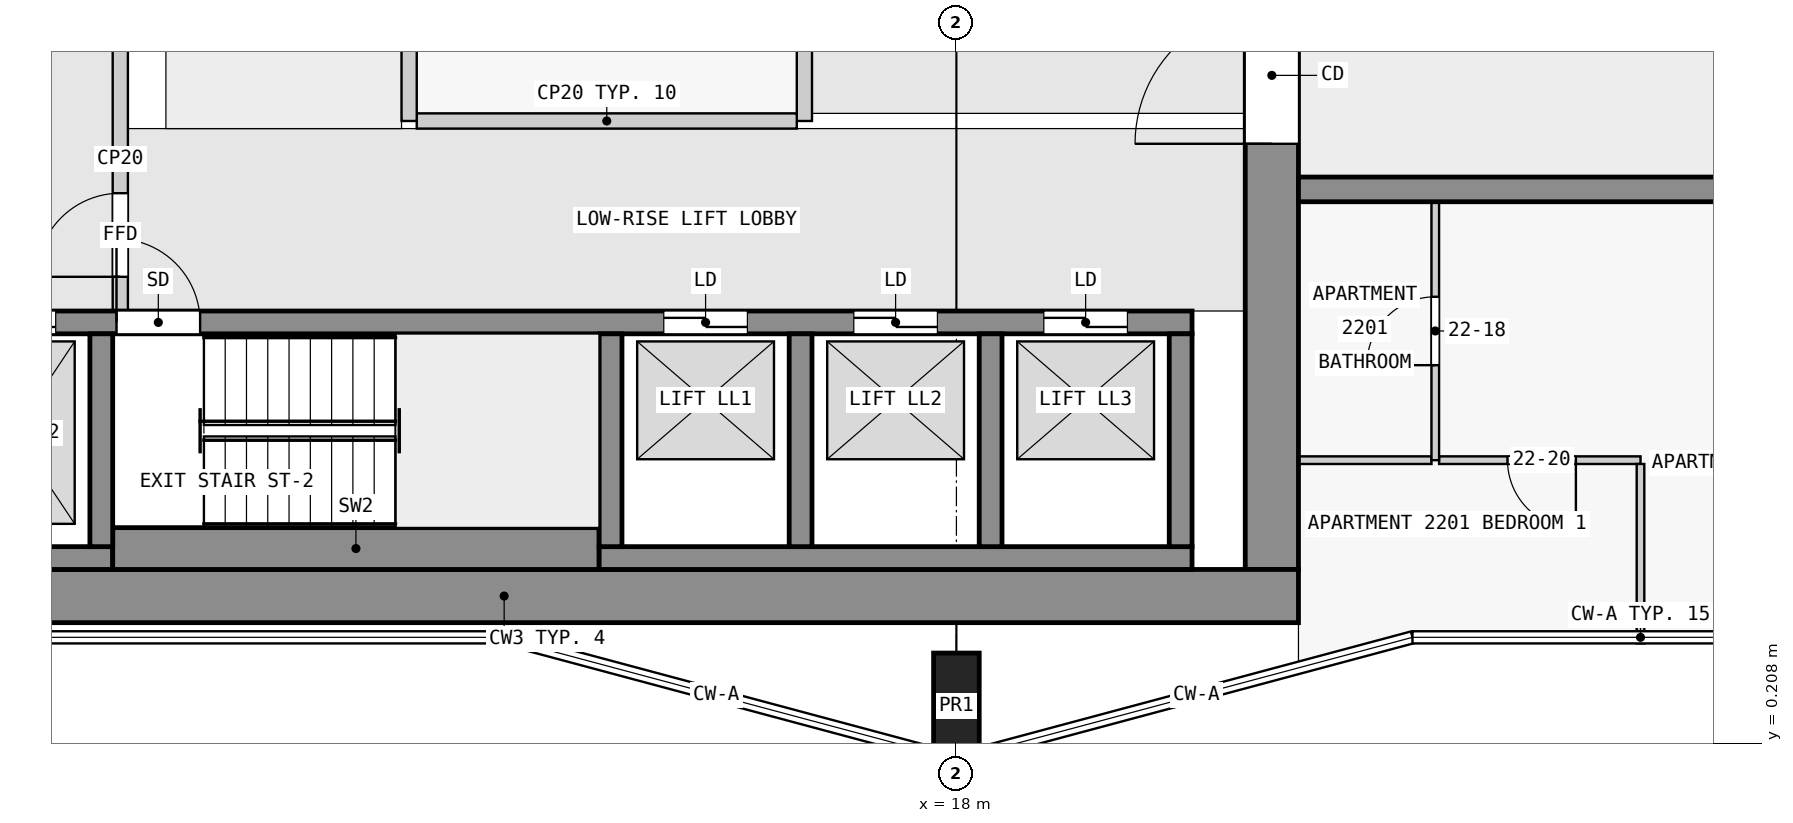
"""IFC4 building model, lengths in metres.
Left out: names, types, materials, properties, quantities, classifications, styles, units other than length and angle.
Written with IfcOpenShell. Run it as: python <this file> out.ifc"""

import sys

from ifc_helpers import new_model, si_unit, direction, frame, frame_2d, origin, origin_2d, place, context, subcontext, project, spatial, rectangle, extrude, element, fill, save


model = new_model("IFC4")
c1 = context("Model", 3, precision=1e-05, world=origin(), true_north=direction((0.0, 1.0)))
c2 = subcontext(c1, "Body", "Model", "MODEL_VIEW")
j1 = project(units=[si_unit("LENGTHUNIT", "METRE"), si_unit("PLANEANGLEUNIT", "RADIAN")], contexts=[c1])
p1 = place(None, origin())
s1 = spatial("IfcSite", under=j1, at=p1, CompositionType="ELEMENT")
p2 = place(p1, origin())
s2 = spatial("IfcBuilding", under=s1, at=p2, CompositionType="ELEMENT")
p3 = place(p2, frame((0.0, 0.0, 88.8)))
s3 = spatial("IfcBuildingStorey", under=s2, at=p3, CompositionType="ELEMENT", Elevation=88.8)
p4 = place(p3, frame((18.0, 0.7, 0.0), z_axis=(0.0, 0.0, 1.0), x_axis=(1.0, 0.0, 0.0)))
e1 = element("IfcColumn", 1, at=p4, inside=s3, PredefinedType="COLUMN", context=c2, shape_type="SweptSolid", body=[
    extrude(rectangle(XDim=0.6, YDim=1.4, at=origin_2d()), origin(), (0.0, 0.0, 1.0), 3.5),
])
p5 = place(p3, frame((1.6, 2.15, 0.0), z_axis=(0.0, 0.0, 1.0), x_axis=(1.0, 0.0, 0.0)))
e2 = element("IfcWall", 2, at=p5, inside=s3, PredefinedType="SHEAR", context=c2, shape_type="SweptSolid", body=[
    extrude(rectangle(XDim=20.9, YDim=0.7, at=frame_2d((10.45, 0.0))), origin(), (0.0, 0.0, 1.0), 3.25),
])
p6 = place(p3, frame((22.15, 2.5, 0.0), z_axis=(0.0, 0.0, 1.0), x_axis=(0.0, 1.0, 0.0)))
e3 = element("IfcWall", 3, at=p6, inside=s3, PredefinedType="SHEAR", context=c2, shape_type="SweptSolid", body=[
    extrude(rectangle(XDim=14.8, YDim=0.7, at=frame_2d((7.4, 0.0))), origin(), (0.0, 0.0, 1.0), 3.25),
])
p7 = place(p6, frame((5.6, 0.0, 0.0)))
e4 = element("IfcOpeningElement", 4, at=p7, cuts=e3, PredefinedType="OPENING", context=c2, shape_type="SweptSolid", body=[
    extrude(rectangle(XDim=1.8, YDim=2.1, at=frame_2d((0.9, 1.05))), frame((0.0, 0.36, 0.0), z_axis=(0.0, -1.0, 0.0), x_axis=(1.0, 0.0, 0.0)), (0.0, 0.0, 1.0), 0.72),
])
p8 = place(p3, frame((2.3, 2.65, 0.0), z_axis=(0.0, 0.0, 1.0), x_axis=(1.0, 0.0, 0.0)))
e5 = element("IfcWall", 5, at=p8, inside=s3, PredefinedType="SHEAR", context=c2, shape_type="SweptSolid", body=[
    extrude(rectangle(XDim=4.6, YDim=0.3, at=frame_2d((2.3, 0.0))), origin(), (0.0, 0.0, 1.0), 3.25),
])
p9 = place(p3, frame((6.9, 2.775, 0.0), z_axis=(0.0, 0.0, 1.0), x_axis=(1.0, 0.0, 0.0)))
e6 = element("IfcWall", 6, at=p9, inside=s3, PredefinedType="SHEAR", context=c2, shape_type="SweptSolid", body=[
    extrude(rectangle(XDim=6.4, YDim=0.55, at=frame_2d((3.2, 0.0))), origin(), (0.0, 0.0, 1.0), 3.25),
])
p10 = place(p3, frame((13.3, 2.65, 0.0), z_axis=(0.0, 0.0, 1.0), x_axis=(1.0, 0.0, 0.0)))
e7 = element("IfcWall", 7, at=p10, inside=s3, PredefinedType="SHEAR", context=c2, shape_type="SweptSolid", body=[
    extrude(rectangle(XDim=7.8, YDim=0.3, at=frame_2d((3.9, 0.0))), origin(), (0.0, 0.0, 1.0), 3.25),
])
for number, where, z_axis, x_axis in (
    (8, (6.75, 2.8, 0.0), (0.0, 0.0, 1.0), (0.0, 1.0, 0.0)),
    (9, (13.45, 2.8, 0.0), (0.0, 0.0, 1.0), (0.0, 1.0, 0.0)),
    (10, (15.95, 2.8, 0.0), (0.0, 0.0, 1.0), (0.0, 1.0, 0.0)),
    (11, (18.45, 2.8, 0.0), (0.0, 0.0, 1.0), (0.0, 1.0, 0.0)),
    (12, (20.95, 2.8, 0.0), (0.0, 0.0, 1.0), (0.0, 1.0, 0.0)),
):
    element("IfcWall", number, at=place(p3, frame(where, z_axis=z_axis, x_axis=x_axis)), inside=s3, PredefinedType="SHEAR", context=c2, shape_type="SweptSolid", body=[
        extrude(rectangle(XDim=2.8, YDim=0.3, at=frame_2d((1.4, 0.0))), origin(), (0.0, 0.0, 1.0), 3.25),
    ])
p11 = place(p3, frame((2.3, 5.75, 0.0), z_axis=(0.0, 0.0, 1.0), x_axis=(1.0, 0.0, 0.0)))
e13 = element("IfcWall", 13, at=p11, inside=s3, PredefinedType="SHEAR", context=c2, shape_type="SweptSolid", body=[
    extrude(rectangle(XDim=18.8, YDim=0.3, at=frame_2d((9.4, 0.0))), origin(), (0.0, 0.0, 1.0), 3.25),
])
p12 = place(p11, frame((4.65, 0.0, 0.0)))
e14 = element("IfcOpeningElement", 14, at=p12, cuts=e13, PredefinedType="OPENING", context=c2, shape_type="SweptSolid", body=[
    extrude(rectangle(XDim=1.1, YDim=2.1, at=frame_2d((0.55, 1.05))), frame((0.0, 0.16, 0.0), z_axis=(0.0, -1.0, 0.0), x_axis=(1.0, 0.0, 0.0)), (0.0, 0.0, 1.0), 0.32),
])
p13 = place(p11, frame((0.45, 0.0, 0.0)))
e15 = element("IfcOpeningElement", 15, at=p13, cuts=e13, PredefinedType="OPENING", context=c2, shape_type="SweptSolid", body=[
    extrude(rectangle(XDim=1.1, YDim=2.1, at=frame_2d((0.55, 1.05))), frame((0.0, 0.16, 0.0), z_axis=(0.0, -1.0, 0.0), x_axis=(1.0, 0.0, 0.0)), (0.0, 0.0, 1.0), 0.32),
])
p14 = place(p11, frame((2.75, 0.0, 0.0)))
e16 = element("IfcOpeningElement", 16, at=p14, cuts=e13, PredefinedType="OPENING", context=c2, shape_type="SweptSolid", body=[
    extrude(rectangle(XDim=1.1, YDim=2.1, at=frame_2d((0.55, 1.05))), frame((0.0, 0.16, 0.0), z_axis=(0.0, -1.0, 0.0), x_axis=(1.0, 0.0, 0.0)), (0.0, 0.0, 1.0), 0.32),
])
p15 = place(p11, frame((11.85, 0.0, 0.0)))
e17 = element("IfcOpeningElement", 17, at=p15, cuts=e13, PredefinedType="OPENING", context=c2, shape_type="SweptSolid", body=[
    extrude(rectangle(XDim=1.1, YDim=2.1, at=frame_2d((0.55, 1.05))), frame((0.0, 0.16, 0.0), z_axis=(0.0, -1.0, 0.0), x_axis=(1.0, 0.0, 0.0)), (0.0, 0.0, 1.0), 0.32),
])
p16 = place(p11, frame((14.35, 0.0, 0.0)))
e18 = element("IfcOpeningElement", 18, at=p16, cuts=e13, PredefinedType="OPENING", context=c2, shape_type="SweptSolid", body=[
    extrude(rectangle(XDim=1.1, YDim=2.1, at=frame_2d((0.55, 1.05))), frame((0.0, 0.16, 0.0), z_axis=(0.0, -1.0, 0.0), x_axis=(1.0, 0.0, 0.0)), (0.0, 0.0, 1.0), 0.32),
])
p17 = place(p11, frame((16.85, 0.0, 0.0)))
e19 = element("IfcOpeningElement", 19, at=p17, cuts=e13, PredefinedType="OPENING", context=c2, shape_type="SweptSolid", body=[
    extrude(rectangle(XDim=1.1, YDim=2.1, at=frame_2d((0.55, 1.05))), frame((0.0, 0.16, 0.0), z_axis=(0.0, -1.0, 0.0), x_axis=(1.0, 0.0, 0.0)), (0.0, 0.0, 1.0), 0.32),
])
p18 = place(p3, frame((22.5, 7.5, 0.0), z_axis=(0.0, 0.0, 1.0), x_axis=(1.0, 0.0, 0.0)))
e20 = element("IfcWall", 20, at=p18, inside=s3, PredefinedType="SHEAR", context=c2, shape_type="SweptSolid", body=[
    extrude(rectangle(XDim=22.5, YDim=0.325, at=frame_2d((11.25, 0.0))), origin(), (0.0, 0.0, 1.0), 3.25),
])
p19 = place(p18, frame((5.65, 0.0, 0.0)))
e21 = element("IfcOpeningElement", 21, at=p19, cuts=e20, PredefinedType="OPENING", context=c2, shape_type="SweptSolid", body=[
    extrude(rectangle(XDim=1.0, YDim=2.1, at=frame_2d((0.5, 1.05))), frame((0.0, 0.172, 0.0), z_axis=(0.0, -1.0, 0.0), x_axis=(1.0, 0.0, 0.0)), (0.0, 0.0, 1.0), 0.345),
])
p20 = place(p18, frame((15.25, 0.0, 0.0)))
e22 = element("IfcOpeningElement", 22, at=p20, cuts=e20, PredefinedType="OPENING", context=c2, shape_type="SweptSolid", body=[
    extrude(rectangle(XDim=1.0, YDim=2.1, at=frame_2d((0.5, 1.05))), frame((0.0, 0.172, 0.0), z_axis=(0.0, -1.0, 0.0), x_axis=(1.0, 0.0, 0.0)), (0.0, 0.0, 1.0), 0.345),
])
p21 = place(p18, frame((18.75, 0.0, 0.0)))
e23 = element("IfcOpeningElement", 23, at=p21, cuts=e20, PredefinedType="OPENING", context=c2, shape_type="SweptSolid", body=[
    extrude(rectangle(XDim=0.9, YDim=2.1, at=frame_2d((0.45, 1.05))), frame((0.0, 0.172, 0.0), z_axis=(0.0, -1.0, 0.0), x_axis=(1.0, 0.0, 0.0)), (0.0, 0.0, 1.0), 0.345),
])
p22 = place(p18, frame((20.95, 0.0, 0.0)))
e24 = element("IfcOpeningElement", 24, at=p22, cuts=e20, PredefinedType="OPENING", context=c2, shape_type="SweptSolid", body=[
    extrude(rectangle(XDim=1.0, YDim=2.1, at=frame_2d((0.5, 1.05))), frame((0.0, 0.172, 0.0), z_axis=(0.0, -1.0, 0.0), x_axis=(1.0, 0.0, 0.0)), (0.0, 0.0, 1.0), 0.345),
])
p23 = place(p3, frame((7.0, 5.9, 0.0), z_axis=(0.0, 0.0, 1.0), x_axis=(0.0, 1.0, 0.0)))
e25 = element("IfcWall", 25, at=p23, inside=s3, PredefinedType="PARTITIONING", context=c2, shape_type="SweptSolid", body=[
    extrude(rectangle(XDim=4.0, YDim=0.2, at=frame_2d((2.0, 0.0))), origin(), (0.0, 0.0, 1.0), 3.25),
])
p24 = place(p23, frame((0.45, 0.0, 0.0)))
e26 = element("IfcOpeningElement", 26, at=p24, cuts=e25, PredefinedType="OPENING", context=c2, shape_type="SweptSolid", body=[
    extrude(rectangle(XDim=1.1, YDim=2.1, at=frame_2d((0.55, 1.05))), frame((0.0, 0.11, 0.0), z_axis=(0.0, -1.0, 0.0), x_axis=(1.0, 0.0, 0.0)), (0.0, 0.0, 1.0), 0.22),
])
p25 = place(p3, frame((10.8, 8.4, 0.0), z_axis=(0.0, 0.0, 1.0), x_axis=(0.0, 1.0, 0.0)))
e27 = element("IfcWall", 27, at=p25, inside=s3, PredefinedType="PARTITIONING", context=c2, shape_type="SweptSolid", body=[
    extrude(rectangle(XDim=6.2, YDim=0.2, at=frame_2d((3.1, 0.0))), origin(), (0.0, 0.0, 1.0), 3.25),
])
p26 = place(p3, frame((10.9, 8.4, 0.0), z_axis=(0.0, 0.0, 1.0), x_axis=(1.0, 0.0, 0.0)))
e28 = element("IfcWall", 28, at=p26, inside=s3, PredefinedType="PARTITIONING", context=c2, shape_type="SweptSolid", body=[
    extrude(rectangle(XDim=5.0, YDim=0.2, at=frame_2d((2.5, 0.0))), origin(), (0.0, 0.0, 1.0), 3.25),
])
p27 = place(p3, frame((16.0, 8.4, 0.0), z_axis=(0.0, 0.0, 1.0), x_axis=(0.0, 1.0, 0.0)))
e29 = element("IfcWall", 29, at=p27, inside=s3, PredefinedType="PARTITIONING", context=c2, shape_type="SweptSolid", body=[
    extrude(rectangle(XDim=6.2, YDim=0.2, at=frame_2d((3.1, 0.0))), origin(), (0.0, 0.0, 1.0), 3.25),
])
p28 = place(p27, frame((3.15, 0.0, 0.0)))
e30 = element("IfcOpeningElement", 30, at=p28, cuts=e29, PredefinedType="OPENING", context=c2, shape_type="SweptSolid", body=[
    extrude(rectangle(XDim=0.9, YDim=2.1, at=frame_2d((0.45, 1.05))), frame((0.0, 0.11, 0.0), z_axis=(0.0, -1.0, 0.0), x_axis=(1.0, 0.0, 0.0)), (0.0, 0.0, 1.0), 0.22),
])
p29 = place(p3, frame((27.0, 3.938, 0.0), z_axis=(0.0, 0.0, 1.0), x_axis=(-1.0, 0.0, 0.0)))
e31 = element("IfcWall", 31, at=p29, inside=s3, PredefinedType="PARTITIONING", context=c2, shape_type="SweptSolid", body=[
    extrude(rectangle(XDim=2.65, YDim=0.1, at=frame_2d((1.325, 0.0))), origin(), (0.0, 0.0, 1.0), 3.25),
])
p30 = place(p29, frame((0.85, 0.0, 0.0)))
e32 = element("IfcOpeningElement", 32, at=p30, cuts=e31, PredefinedType="OPENING", context=c2, shape_type="SweptSolid", body=[
    extrude(rectangle(XDim=0.9, YDim=2.1, at=frame_2d((0.45, 1.05))), frame((0.0, 0.06, 0.0), z_axis=(0.0, -1.0, 0.0), x_axis=(1.0, 0.0, 0.0)), (0.0, 0.0, 1.0), 0.12),
])
p31 = place(p3, frame((22.5, 3.938, 0.0), z_axis=(0.0, 0.0, 1.0), x_axis=(1.0, 0.0, 0.0)))
e33 = element("IfcWall", 33, at=p31, inside=s3, PredefinedType="PARTITIONING", context=c2, shape_type="SweptSolid", body=[
    extrude(rectangle(XDim=1.75, YDim=0.1, at=frame_2d((0.875, 0.0))), origin(), (0.0, 0.0, 1.0), 3.25),
])
p32 = place(p3, frame((24.3, 3.938, 0.0), z_axis=(0.0, 0.0, 1.0), x_axis=(0.0, 1.0, 0.0)))
e34 = element("IfcWall", 34, at=p32, inside=s3, PredefinedType="PARTITIONING", context=c2, shape_type="SweptSolid", body=[
    extrude(rectangle(XDim=3.4, YDim=0.1, at=frame_2d((1.7, 0.0))), origin(), (0.0, 0.0, 1.0), 3.25),
])
p33 = place(p32, frame((1.25, 0.0, 0.0)))
e35 = element("IfcOpeningElement", 35, at=p33, cuts=e34, PredefinedType="OPENING", context=c2, shape_type="SweptSolid", body=[
    extrude(rectangle(XDim=0.9, YDim=2.1, at=frame_2d((0.45, 1.05))), frame((0.0, 0.06, 0.0), z_axis=(0.0, -1.0, 0.0), x_axis=(1.0, 0.0, 0.0)), (0.0, 0.0, 1.0), 0.12),
])
p34 = place(p3, frame((27.0, 1.527, 0.0), z_axis=(0.0, 0.0, 1.0), x_axis=(0.0, 1.0, 0.0)))
e36 = element("IfcWall", 36, at=p34, inside=s3, PredefinedType="PARTITIONING", context=c2, shape_type="SweptSolid", body=[
    extrude(rectangle(XDim=2.361, YDim=0.1, at=frame_2d((1.18, 0.0))), origin(), (0.0, 0.0, 1.0), 3.25),
])
p35 = place(p24, origin())
e37 = element("IfcDoor", 37, at=p35, inside=s3, OperationType="SINGLE_SWING_LEFT", PredefinedType="DOOR", context=c2, shape_type="SweptSolid", body=[
    extrude(rectangle(XDim=1.1, YDim=2.1, at=frame_2d((0.55, 1.05))), frame((0.0, 0.025, 0.0), z_axis=(0.0, -1.0, 0.0), x_axis=(1.0, 0.0, 0.0)), (0.0, 0.0, 1.0), 0.05),
])
fill(e26, e37)
p36 = place(p12, origin())
e38 = element("IfcDoor", 38, at=p36, inside=s3, OperationType="SINGLE_SWING_LEFT", PredefinedType="DOOR", context=c2, shape_type="SweptSolid", body=[
    extrude(rectangle(XDim=1.1, YDim=2.1, at=frame_2d((0.55, 1.05))), frame((0.0, 0.025, 0.0), z_axis=(0.0, -1.0, 0.0), x_axis=(1.0, 0.0, 0.0)), (0.0, 0.0, 1.0), 0.05),
])
fill(e14, e38)
p37 = place(p14, origin())
e39 = element("IfcDoor", 39, at=p37, inside=s3, OperationType="DOUBLE_DOOR_SLIDING", PredefinedType="DOOR", context=c2, shape_type="SweptSolid", body=[
    extrude(rectangle(XDim=1.1, YDim=2.1, at=frame_2d((0.55, 1.05))), frame((0.0, 0.025, 0.0), z_axis=(0.0, -1.0, 0.0), x_axis=(1.0, 0.0, 0.0)), (0.0, 0.0, 1.0), 0.05),
])
fill(e16, e39)
p38 = place(p15, origin())
e40 = element("IfcDoor", 40, at=p38, inside=s3, OperationType="DOUBLE_DOOR_SLIDING", PredefinedType="DOOR", context=c2, shape_type="SweptSolid", body=[
    extrude(rectangle(XDim=1.1, YDim=2.1, at=frame_2d((0.55, 1.05))), frame((0.0, 0.025, 0.0), z_axis=(0.0, -1.0, 0.0), x_axis=(1.0, 0.0, 0.0)), (0.0, 0.0, 1.0), 0.05),
])
fill(e17, e40)
p39 = place(p16, origin())
e41 = element("IfcDoor", 41, at=p39, inside=s3, OperationType="DOUBLE_DOOR_SLIDING", PredefinedType="DOOR", context=c2, shape_type="SweptSolid", body=[
    extrude(rectangle(XDim=1.1, YDim=2.1, at=frame_2d((0.55, 1.05))), frame((0.0, 0.025, 0.0), z_axis=(0.0, -1.0, 0.0), x_axis=(1.0, 0.0, 0.0)), (0.0, 0.0, 1.0), 0.05),
])
fill(e18, e41)
p40 = place(p17, origin())
e42 = element("IfcDoor", 42, at=p40, inside=s3, OperationType="DOUBLE_DOOR_SLIDING", PredefinedType="DOOR", context=c2, shape_type="SweptSolid", body=[
    extrude(rectangle(XDim=1.1, YDim=2.1, at=frame_2d((0.55, 1.05))), frame((0.0, 0.025, 0.0), z_axis=(0.0, -1.0, 0.0), x_axis=(1.0, 0.0, 0.0)), (0.0, 0.0, 1.0), 0.05),
])
fill(e19, e42)
p41 = place(p7, origin())
e43 = element("IfcDoor", 43, at=p41, inside=s3, OperationType="DOUBLE_DOOR_SINGLE_SWING", PredefinedType="DOOR", context=c2, shape_type="SweptSolid", body=[
    extrude(rectangle(XDim=1.8, YDim=2.1, at=frame_2d((0.9, 1.05))), frame((0.0, 0.025, 0.0), z_axis=(0.0, -1.0, 0.0), x_axis=(1.0, 0.0, 0.0)), (0.0, 0.0, 1.0), 0.05),
])
fill(e4, e43)
p42 = place(p33, origin())
e44 = element("IfcDoor", 44, at=p42, inside=s3, OperationType="SINGLE_SWING_LEFT", PredefinedType="DOOR", context=c2, shape_type="SweptSolid", body=[
    extrude(rectangle(XDim=0.9, YDim=2.1, at=frame_2d((0.45, 1.05))), frame((0.0, 0.025, 0.0), z_axis=(0.0, -1.0, 0.0), x_axis=(1.0, 0.0, 0.0)), (0.0, 0.0, 1.0), 0.05),
])
fill(e35, e44)
p43 = place(p30, origin())
e45 = element("IfcDoor", 45, at=p43, inside=s3, OperationType="SINGLE_SWING_LEFT", PredefinedType="DOOR", context=c2, shape_type="SweptSolid", body=[
    extrude(rectangle(XDim=0.9, YDim=2.1, at=frame_2d((0.45, 1.05))), frame((0.0, 0.025, 0.0), z_axis=(0.0, -1.0, 0.0), x_axis=(1.0, 0.0, 0.0)), (0.0, 0.0, 1.0), 0.05),
])
fill(e32, e45)
save(model, sys.argv[1])
